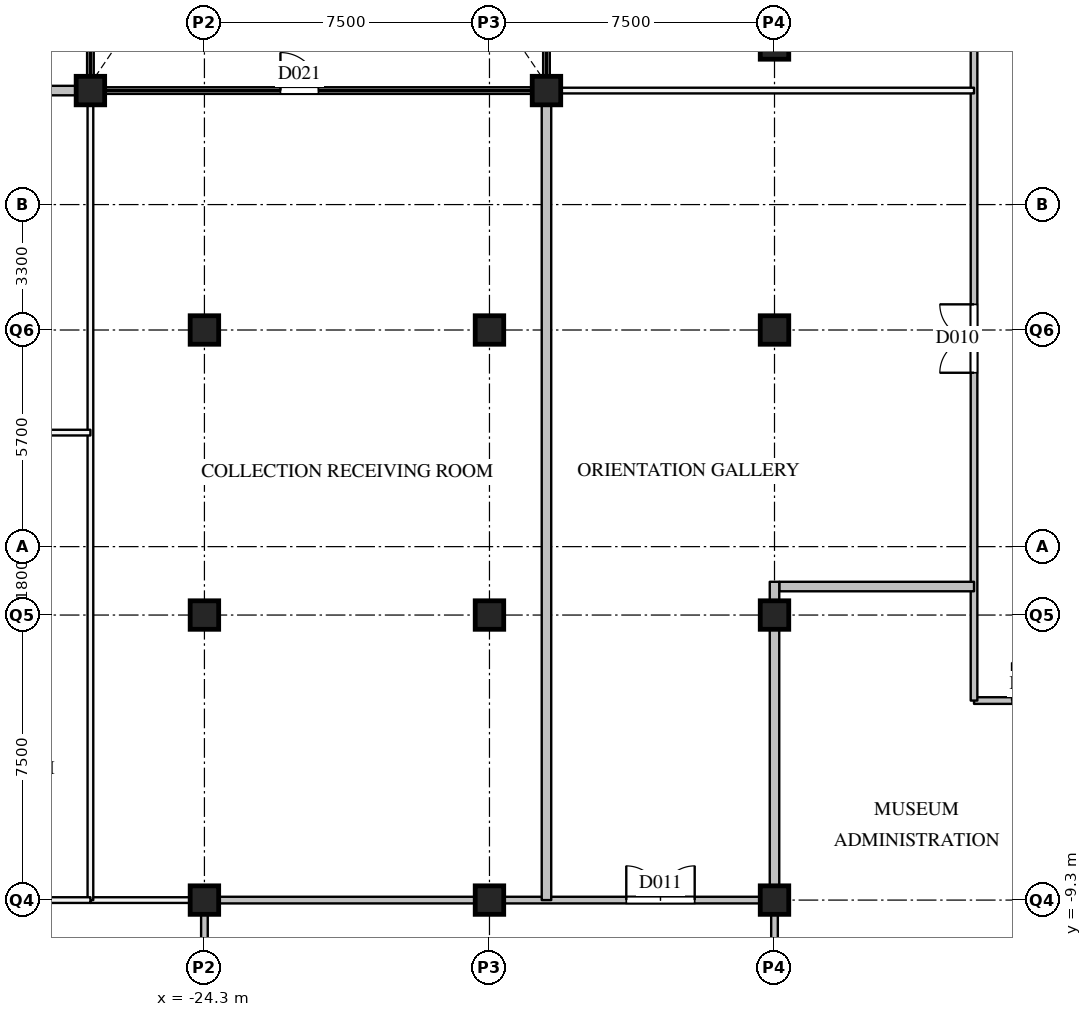
"""IFC4 building model, lengths in metres.
Left out: names, types, materials, properties, quantities, classifications, styles, units other than length and angle.
Written with IfcOpenShell. Run it as: python <this file> out.ifc"""

import sys

from ifc_helpers import new_model, si_unit, direction, frame, frame_2d, origin, origin_2d, place, context, subcontext, project, spatial, rectangle, extrude, element, fill, save


model = new_model("IFC4")
c1 = context("Model", 3, precision=1e-05, world=origin(), true_north=direction((0.0, 1.0)))
c2 = subcontext(c1, "Body", "Model", "MODEL_VIEW")
j1 = project(units=[si_unit("LENGTHUNIT", "METRE"), si_unit("PLANEANGLEUNIT", "RADIAN")], contexts=[c1])
p1 = place(None, origin())
s1 = spatial("IfcSite", under=j1, at=p1, CompositionType="ELEMENT")
p2 = place(p1, origin())
s2 = spatial("IfcBuilding", under=s1, at=p2, CompositionType="ELEMENT")
p3 = place(p2, origin())
s3 = spatial("IfcBuildingStorey", under=s2, at=p3, CompositionType="ELEMENT", Elevation=0.0)
for number, where, z_axis, x_axis in (
    (1, (-24.3, -9.3, 0.0), (0.0, 0.0, 1.0), (1.0, 0.0, 0.0)),
    (2, (-24.3, -1.8, 0.0), (0.0, 0.0, 1.0), (1.0, 0.0, 0.0)),
    (3, (-24.3, 5.7, 0.0), (0.0, 0.0, 1.0), (1.0, 0.0, 0.0)),
    (4, (-16.8, -9.3, 0.0), (0.0, 0.0, 1.0), (1.0, 0.0, 0.0)),
    (5, (-16.8, -1.8, 0.0), (0.0, 0.0, 1.0), (1.0, 0.0, 0.0)),
    (6, (-16.8, 5.7, 0.0), (0.0, 0.0, 1.0), (1.0, 0.0, 0.0)),
    (7, (-9.3, -9.3, 0.0), (0.0, 0.0, 1.0), (1.0, 0.0, 0.0)),
    (8, (-9.3, -1.8, 0.0), (0.0, 0.0, 1.0), (1.0, 0.0, 0.0)),
    (9, (-9.3, 5.7, 0.0), (0.0, 0.0, 1.0), (1.0, 0.0, 0.0)),
    (10, (-9.3, 13.2, 0.0), (0.0, 0.0, 1.0), (1.0, 0.0, 0.0)),
    (11, (-27.3, 12.0, 0.0), (0.0, 0.0, 1.0), (1.0, 0.0, 0.0)),
    (12, (-15.3, 12.0, 0.0), (0.0, 0.0, 1.0), (1.0, 0.0, 0.0)),
):
    element("IfcColumn", number, at=place(p3, frame(where, z_axis=z_axis, x_axis=x_axis)), inside=s3, PredefinedType="COLUMN", context=c2, shape_type="SweptSolid", body=[
        extrude(rectangle(XDim=0.75, YDim=0.75, at=origin_2d()), origin(), (0.0, 0.0, 1.0), 8.0),
    ])
p4 = place(p3, frame((-24.3, -9.3, 0.0), z_axis=(0.0, 0.0, 1.0), x_axis=(1.0, 0.0, 0.0)))
e13 = element("IfcWall", 13, at=p4, inside=s3, PredefinedType="PARTITIONING", context=c2, shape_type="SweptSolid", body=[
    extrude(rectangle(XDim=15.0, YDim=0.175, at=frame_2d((7.5, 0.0))), origin(), (0.0, 0.0, 1.0), 6.79),
])
p5 = place(p4, frame((11.1, 0.0, 0.0)))
e14 = element("IfcOpeningElement", 14, at=p5, cuts=e13, PredefinedType="OPENING", context=c2, shape_type="SweptSolid", body=[
    extrude(rectangle(XDim=1.8, YDim=2.1, at=frame_2d((0.9, 1.05))), frame((0.0, 0.097, 0.0), z_axis=(0.0, -1.0, 0.0), x_axis=(1.0, 0.0, 0.0)), (0.0, 0.0, 1.0), 0.195),
])
p6 = place(p3, frame((-4.05, -4.05, 0.0), z_axis=(0.0, 0.0, 1.0), x_axis=(1.0, 0.0, 0.0)))
e15 = element("IfcWall", 15, at=p6, inside=s3, PredefinedType="PARTITIONING", context=c2, shape_type="SweptSolid", body=[
    extrude(rectangle(XDim=18.0, YDim=0.175, at=frame_2d((9.0, 0.0))), origin(), (0.0, 0.0, 1.0), 6.79),
])
p7 = place(p6, frame((1.0, 0.0, 0.0)))
e16 = element("IfcOpeningElement", 16, at=p7, cuts=e15, PredefinedType="OPENING", context=c2, shape_type="SweptSolid", body=[
    extrude(rectangle(XDim=1.0, YDim=2.1, at=frame_2d((0.5, 1.05))), frame((0.0, 0.097, 0.0), z_axis=(0.0, -1.0, 0.0), x_axis=(1.0, 0.0, 0.0)), (0.0, 0.0, 1.0), 0.195),
])
p8 = place(p6, frame((10.0, 0.0, 0.0)))
e17 = element("IfcOpeningElement", 17, at=p8, cuts=e15, PredefinedType="OPENING", context=c2, shape_type="SweptSolid", body=[
    extrude(rectangle(XDim=1.0, YDim=2.1, at=frame_2d((0.5, 1.05))), frame((0.0, 0.097, 0.0), z_axis=(0.0, -1.0, 0.0), x_axis=(1.0, 0.0, 0.0)), (0.0, 0.0, 1.0), 0.195),
])
p9 = place(p3, frame((-27.3, 12.0, 0.0), z_axis=(0.0, 0.0, 1.0), x_axis=(1.0, 0.0, 0.0)))
e18 = element("IfcWall", 18, at=p9, inside=s3, PredefinedType="PARTITIONING", context=c2, shape_type="SweptSolid", body=[
    extrude(rectangle(XDim=12.0, YDim=0.175, at=frame_2d((6.0, 0.0))), origin(), (0.0, 0.0, 1.0), 7.59),
])
p10 = place(p9, frame((5.0, 0.0, 0.0)))
e19 = element("IfcOpeningElement", 19, at=p10, cuts=e18, PredefinedType="OPENING", context=c2, shape_type="SweptSolid", body=[
    extrude(rectangle(XDim=1.0, YDim=2.1, at=frame_2d((0.5, 1.05))), frame((0.0, 0.097, 0.0), z_axis=(0.0, -1.0, 0.0), x_axis=(1.0, 0.0, 0.0)), (0.0, 0.0, 1.0), 0.195),
])
p11 = place(p3, frame((-27.3, 12.0, 0.0), z_axis=(0.0, 0.0, 1.0), x_axis=(0.0, 1.0, 0.0)))
e20 = element("IfcWall", 20, at=p11, inside=s3, PredefinedType="PARTITIONING", context=c2, shape_type="SweptSolid", body=[
    extrude(rectangle(XDim=35.35, YDim=0.175, at=frame_2d((17.675, 0.0))), origin(), (0.0, 0.0, 1.0), 6.79),
])
p12 = place(p11, frame((18.4, 0.0, 0.0)))
e21 = element("IfcOpeningElement", 21, at=p12, cuts=e20, PredefinedType="OPENING", context=c2, shape_type="SweptSolid", body=[
    extrude(rectangle(XDim=1.8, YDim=2.1, at=frame_2d((0.9, 1.05))), frame((0.0, 0.097, 0.0), z_axis=(0.0, -1.0, 0.0), x_axis=(1.0, 0.0, 0.0)), (0.0, 0.0, 1.0), 0.195),
])
p13 = place(p11, frame((23.7, 0.0, 0.0)))
e22 = element("IfcOpeningElement", 22, at=p13, cuts=e20, PredefinedType="OPENING", context=c2, shape_type="SweptSolid", body=[
    extrude(rectangle(XDim=1.8, YDim=2.1, at=frame_2d((0.9, 1.05))), frame((0.0, 0.097, 0.0), z_axis=(0.0, -1.0, 0.0), x_axis=(1.0, 0.0, 0.0)), (0.0, 0.0, 1.0), 0.195),
])
p14 = place(p11, frame((4.688, 0.0, 0.0)))
e23 = element("IfcOpeningElement", 23, at=p14, cuts=e20, PredefinedType="OPENING", context=c2, shape_type="SweptSolid", body=[
    extrude(rectangle(XDim=1.0, YDim=2.1, at=frame_2d((0.5, 1.05))), frame((0.0, 0.097, 0.0), z_axis=(0.0, -1.0, 0.0), x_axis=(1.0, 0.0, 0.0)), (0.0, 0.0, 1.0), 0.195),
])
p15 = place(p3, frame((-24.3, -20.95, 0.0), z_axis=(0.0, 0.0, 1.0), x_axis=(0.0, 1.0, 0.0)))
e24 = element("IfcWall", 24, at=p15, inside=s3, PredefinedType="PARTITIONING", context=c2, shape_type="SweptSolid", body=[
    extrude(rectangle(XDim=11.65, YDim=0.175, at=frame_2d((5.825, 0.0))), origin(), (0.0, 0.0, 1.0), 6.79),
])
p16 = place(p15, frame((5.325, 0.0, 0.0)))
e25 = element("IfcOpeningElement", 25, at=p16, cuts=e24, PredefinedType="OPENING", context=c2, shape_type="SweptSolid", body=[
    extrude(rectangle(XDim=1.0, YDim=2.1, at=frame_2d((0.5, 1.05))), frame((0.0, 0.097, 0.0), z_axis=(0.0, -1.0, 0.0), x_axis=(1.0, 0.0, 0.0)), (0.0, 0.0, 1.0), 0.195),
])
p17 = place(p3, frame((-15.3, 12.0, 0.0), z_axis=(0.0, 0.0, 1.0), x_axis=(0.0, 1.0, 0.0)))
e26 = element("IfcWall", 26, at=p17, inside=s3, PredefinedType="PARTITIONING", context=c2, shape_type="SweptSolid", body=[
    extrude(rectangle(XDim=18.0, YDim=0.175, at=frame_2d((9.0, 0.0))), origin(), (0.0, 0.0, 1.0), 7.59),
])
p18 = place(p3, frame((-9.3, -32.55, 0.0), z_axis=(0.0, 0.0, 1.0), x_axis=(0.0, 1.0, 0.0)))
e27 = element("IfcWall", 27, at=p18, inside=s3, PredefinedType="PARTITIONING", context=c2, shape_type="SweptSolid", body=[
    extrude(rectangle(XDim=23.25, YDim=0.175, at=frame_2d((11.625, 0.0))), origin(), (0.0, 0.0, 1.0), 6.79),
])
p19 = place(p3, frame((-4.05, -4.05, 0.0), z_axis=(0.0, 0.0, 1.0), x_axis=(0.0, 1.0, 0.0)))
e28 = element("IfcWall", 28, at=p19, inside=s3, PredefinedType="PARTITIONING", context=c2, shape_type="SweptSolid", body=[
    extrude(rectangle(XDim=63.0, YDim=0.175, at=frame_2d((31.5, 0.0))), origin(), (0.0, 0.0, 1.0), 6.79),
])
p20 = place(p19, frame((51.535, 0.0, 0.0)))
e29 = element("IfcOpeningElement", 29, at=p20, cuts=e28, PredefinedType="OPENING", context=c2, shape_type="SweptSolid", body=[
    extrude(rectangle(XDim=1.8, YDim=2.1, at=frame_2d((0.9, 1.05))), frame((0.0, 0.097, 0.0), z_axis=(0.0, -1.0, 0.0), x_axis=(1.0, 0.0, 0.0)), (0.0, 0.0, 1.0), 0.195),
])
p21 = place(p19, frame((23.25, 0.0, 0.0)))
e30 = element("IfcOpeningElement", 30, at=p21, cuts=e28, PredefinedType="OPENING", context=c2, shape_type="SweptSolid", body=[
    extrude(rectangle(XDim=1.8, YDim=2.1, at=frame_2d((0.9, 1.05))), frame((0.0, 0.097, 0.0), z_axis=(0.0, -1.0, 0.0), x_axis=(1.0, 0.0, 0.0)), (0.0, 0.0, 1.0), 0.195),
])
p22 = place(p19, frame((38.85, 0.0, 0.0)))
e31 = element("IfcOpeningElement", 31, at=p22, cuts=e28, PredefinedType="OPENING", context=c2, shape_type="SweptSolid", body=[
    extrude(rectangle(XDim=1.8, YDim=2.1, at=frame_2d((0.9, 1.05))), frame((0.0, 0.097, 0.0), z_axis=(0.0, -1.0, 0.0), x_axis=(1.0, 0.0, 0.0)), (0.0, 0.0, 1.0), 0.195),
])
p23 = place(p19, frame((8.625, 0.0, 0.0)))
e32 = element("IfcOpeningElement", 32, at=p23, cuts=e28, PredefinedType="OPENING", context=c2, shape_type="SweptSolid", body=[
    extrude(rectangle(XDim=1.8, YDim=2.1, at=frame_2d((0.9, 1.05))), frame((0.0, 0.097, 0.0), z_axis=(0.0, -1.0, 0.0), x_axis=(1.0, 0.0, 0.0)), (0.0, 0.0, 1.0), 0.195),
])
p24 = place(p3, frame((-27.3, -9.3, 0.0), z_axis=(0.0, 0.0, 1.0), x_axis=(1.0, 0.0, 0.0)))
e33 = element("IfcWall", 33, at=p24, inside=s3, PredefinedType="PARTITIONING", context=c2, shape_type="SweptSolid", body=[
    extrude(rectangle(XDim=3.0, YDim=0.15, at=frame_2d((1.5, 0.0))), origin(), (0.0, 0.0, 1.0), 6.79),
])
p25 = place(p3, frame((-15.3, 12.0, 0.0), z_axis=(0.0, 0.0, 1.0), x_axis=(1.0, 0.0, 0.0)))
e34 = element("IfcWall", 34, at=p25, inside=s3, PredefinedType="PARTITIONING", context=c2, shape_type="SweptSolid", body=[
    extrude(rectangle(XDim=11.25, YDim=0.15, at=frame_2d((5.625, 0.0))), origin(), (0.0, 0.0, 1.0), 6.79),
])
p26 = place(p3, frame((-27.3, -9.3, 0.0), z_axis=(0.0, 0.0, 1.0), x_axis=(0.0, 1.0, 0.0)))
e35 = element("IfcWall", 35, at=p26, inside=s3, PredefinedType="PARTITIONING", context=c2, shape_type="SweptSolid", body=[
    extrude(rectangle(XDim=21.3, YDim=0.15, at=frame_2d((10.65, 0.0))), origin(), (0.0, 0.0, 1.0), 6.79),
])
p27 = place(p3, frame((-32.55, -9.3, 0.0), z_axis=(0.0, 0.0, 1.0), x_axis=(1.0, 0.0, 0.0)))
e36 = element("IfcWall", 36, at=p27, inside=s3, PredefinedType="PARTITIONING", context=c2, shape_type="SweptSolid", body=[
    extrude(rectangle(XDim=5.25, YDim=0.15, at=frame_2d((2.625, 0.0))), origin(), (0.0, 0.0, 1.0), 6.79),
])
p28 = place(p27, frame((2.125, 0.0, 0.0)))
e37 = element("IfcOpeningElement", 37, at=p28, cuts=e36, PredefinedType="OPENING", context=c2, shape_type="SweptSolid", body=[
    extrude(rectangle(XDim=1.0, YDim=2.1, at=frame_2d((0.5, 1.05))), frame((0.0, 0.085, 0.0), z_axis=(0.0, -1.0, 0.0), x_axis=(1.0, 0.0, 0.0)), (0.0, 0.0, 1.0), 0.17),
])
p29 = place(p3, frame((-32.55, 3.0, 0.0), z_axis=(0.0, 0.0, 1.0), x_axis=(1.0, 0.0, 0.0)))
e38 = element("IfcWall", 38, at=p29, inside=s3, PredefinedType="PARTITIONING", context=c2, shape_type="SweptSolid", body=[
    extrude(rectangle(XDim=5.25, YDim=0.15, at=frame_2d((2.625, 0.0))), origin(), (0.0, 0.0, 1.0), 6.79),
])
p30 = place(p29, frame((2.125, 0.0, 0.0)))
e39 = element("IfcOpeningElement", 39, at=p30, cuts=e38, PredefinedType="OPENING", context=c2, shape_type="SweptSolid", body=[
    extrude(rectangle(XDim=1.0, YDim=2.1, at=frame_2d((0.5, 1.05))), frame((0.0, 0.085, 0.0), z_axis=(0.0, -1.0, 0.0), x_axis=(1.0, 0.0, 0.0)), (0.0, 0.0, 1.0), 0.17),
])
p31 = place(p3, frame((-9.175, -1.05, 0.0), z_axis=(0.0, 0.0, 1.0), x_axis=(1.0, 0.0, 0.0)))
e40 = element("IfcWall", 40, at=p31, inside=s3, PredefinedType="PARTITIONING", context=c2, shape_type="SweptSolid", body=[
    extrude(rectangle(XDim=5.125, YDim=0.25, at=frame_2d((2.562, 0.0))), origin(), (0.0, 0.0, 1.0), 6.79),
])
p32 = place(p3, frame((-32.55, 12.0, 0.0), z_axis=(0.0, 0.0, 1.0), x_axis=(1.0, 0.0, 0.0)))
e41 = element("IfcWall", 41, at=p32, inside=s3, PredefinedType="PARTITIONING", context=c2, shape_type="SweptSolid", body=[
    extrude(rectangle(XDim=5.25, YDim=0.25, at=frame_2d((2.625, 0.0))), origin(), (0.0, 0.0, 1.0), 6.79),
])
p33 = place(p3, frame((-15.3, -9.3, 0.0), z_axis=(0.0, 0.0, 1.0), x_axis=(0.0, 1.0, 0.0)))
e42 = element("IfcWall", 42, at=p33, inside=s3, PredefinedType="PARTITIONING", context=c2, shape_type="SweptSolid", body=[
    extrude(rectangle(XDim=21.3, YDim=0.25, at=frame_2d((10.65, 0.0))), origin(), (0.0, 0.0, 1.0), 6.79),
])
p34 = place(p3, frame((-9.3, -9.3, 0.0), z_axis=(0.0, 0.0, 1.0), x_axis=(0.0, 1.0, 0.0)))
e43 = element("IfcWall", 43, at=p34, inside=s3, PredefinedType="PARTITIONING", context=c2, shape_type="SweptSolid", body=[
    extrude(rectangle(XDim=8.375, YDim=0.25, at=frame_2d((4.188, 0.0))), origin(), (0.0, 0.0, 1.0), 6.79),
])
p35 = place(p23, origin())
e44 = element("IfcDoor", 44, at=p35, inside=s3, OperationType="DOUBLE_DOOR_SINGLE_SWING", PredefinedType="DOOR", context=c2, shape_type="SweptSolid", body=[
    extrude(rectangle(XDim=1.8, YDim=2.1, at=frame_2d((0.9, 1.05))), frame((0.0, 0.025, 0.0), z_axis=(0.0, -1.0, 0.0), x_axis=(1.0, 0.0, 0.0)), (0.0, 0.0, 1.0), 0.05),
])
fill(e32, e44)
p36 = place(p5, origin())
e45 = element("IfcDoor", 45, at=p36, inside=s3, OperationType="DOUBLE_DOOR_SINGLE_SWING", PredefinedType="DOOR", context=c2, shape_type="SweptSolid", body=[
    extrude(rectangle(XDim=1.8, YDim=2.1, at=frame_2d((0.9, 1.05))), frame((0.0, 0.025, 0.0), z_axis=(0.0, -1.0, 0.0), x_axis=(1.0, 0.0, 0.0)), (0.0, 0.0, 1.0), 0.05),
])
fill(e14, e45)
p37 = place(p10, origin())
e46 = element("IfcDoor", 46, at=p37, inside=s3, OperationType="SINGLE_SWING_LEFT", PredefinedType="DOOR", context=c2, shape_type="SweptSolid", body=[
    extrude(rectangle(XDim=1.0, YDim=2.1, at=frame_2d((0.5, 1.05))), frame((0.0, 0.025, 0.0), z_axis=(0.0, -1.0, 0.0), x_axis=(1.0, 0.0, 0.0)), (0.0, 0.0, 1.0), 0.05),
])
fill(e19, e46)
save(model, sys.argv[1])
